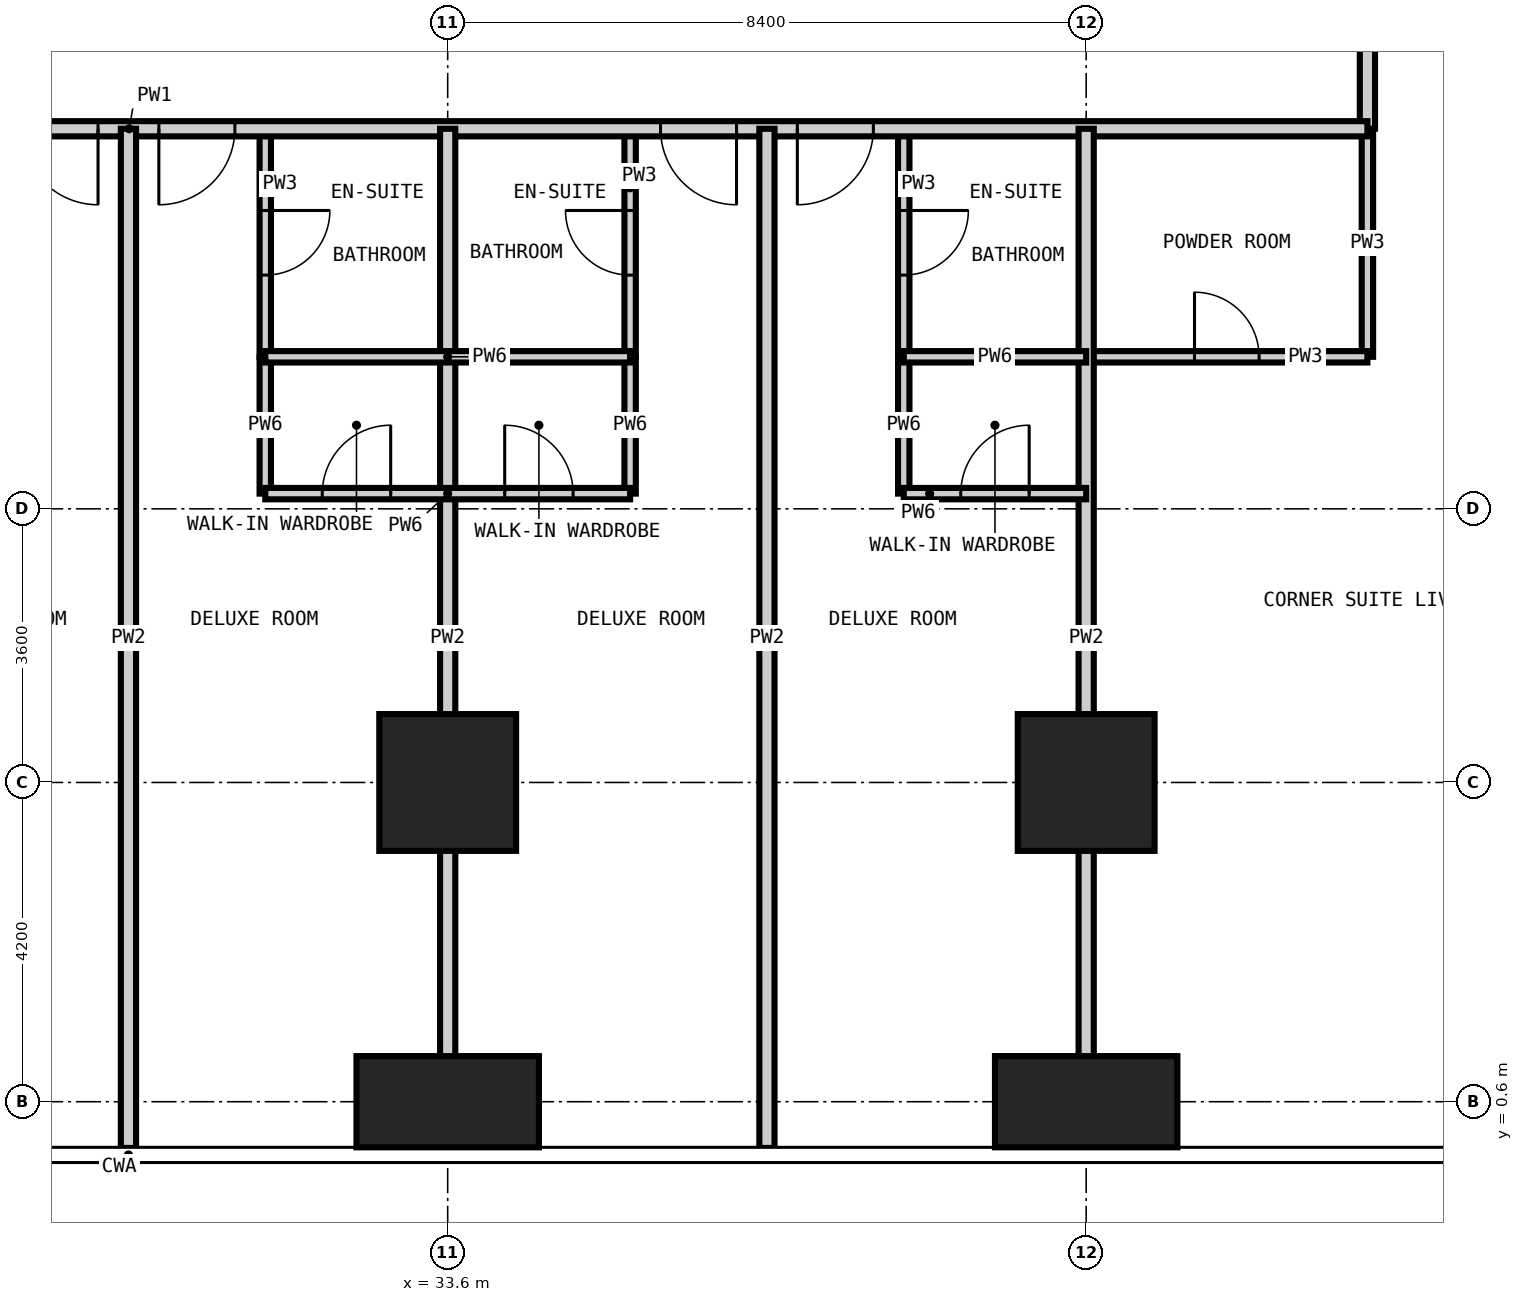
"""IFC4 building model, lengths in metres.
Left out: names, types, materials, properties, quantities, classifications, styles, units other than length and angle.
Written with IfcOpenShell. Run it as: python <this file> out.ifc"""

import sys

from ifc_helpers import new_model, si_unit, direction, frame, frame_2d, origin, origin_2d, place, context, subcontext, project, spatial, rectangle, extrude, element, fill, save


model = new_model("IFC4")
c1 = context("Model", 3, precision=1e-05, world=origin(), true_north=direction((0.0, 1.0)))
c2 = subcontext(c1, "Body", "Model", "MODEL_VIEW")
j1 = project(units=[si_unit("LENGTHUNIT", "METRE"), si_unit("PLANEANGLEUNIT", "RADIAN")], contexts=[c1])
p1 = place(None, origin())
s1 = spatial("IfcSite", under=j1, at=p1, CompositionType="ELEMENT")
p2 = place(p1, origin())
s2 = spatial("IfcBuilding", under=s1, at=p2, CompositionType="ELEMENT")
p3 = place(p2, frame((0.0, 0.0, 27.0)))
s3 = spatial("IfcBuildingStorey", under=s2, at=p3, CompositionType="ELEMENT", Elevation=27.0)
p4 = place(p3, frame((33.6, 0.6, -0.35), z_axis=(0.0, 0.0, 1.0), x_axis=(1.0, 0.0, 0.0)))
e1 = element("IfcColumn", 1, at=p4, inside=s3, PredefinedType="COLUMN", context=c2, shape_type="SweptSolid", body=[
    extrude(rectangle(XDim=2.4, YDim=1.2, at=origin_2d()), origin(), (0.0, 0.0, 1.0), 3.6),
])
p5 = place(p3, frame((33.6, 4.8, -0.35), z_axis=(0.0, 0.0, 1.0), x_axis=(1.0, 0.0, 0.0)))
e2 = element("IfcColumn", 2, at=p5, inside=s3, PredefinedType="COLUMN", context=c2, shape_type="SweptSolid", body=[
    extrude(rectangle(XDim=1.8, YDim=1.8, at=origin_2d()), origin(), (0.0, 0.0, 1.0), 3.6),
])
p6 = place(p3, frame((42.0, 0.6, -0.35), z_axis=(0.0, 0.0, 1.0), x_axis=(1.0, 0.0, 0.0)))
e3 = element("IfcColumn", 3, at=p6, inside=s3, PredefinedType="COLUMN", context=c2, shape_type="SweptSolid", body=[
    extrude(rectangle(XDim=2.4, YDim=1.2, at=origin_2d()), origin(), (0.0, 0.0, 1.0), 3.6),
])
p7 = place(p3, frame((42.0, 4.8, -0.35), z_axis=(0.0, 0.0, 1.0), x_axis=(1.0, 0.0, 0.0)))
e4 = element("IfcColumn", 4, at=p7, inside=s3, PredefinedType="COLUMN", context=c2, shape_type="SweptSolid", body=[
    extrude(rectangle(XDim=1.8, YDim=1.8, at=origin_2d()), origin(), (0.0, 0.0, 1.0), 3.6),
])
p8 = place(p3, frame((31.2, 10.4, 0.0), z_axis=(0.0, 0.0, 1.0), x_axis=(0.0, 1.0, 0.0)))
e5 = element("IfcWall", 5, at=p8, inside=s3, PredefinedType="PARTITIONING", context=c2, shape_type="SweptSolid", body=[
    extrude(rectangle(XDim=3.0, YDim=0.15, at=frame_2d((1.5, 0.0))), origin(), (0.0, 0.0, 1.0), 3.25),
])
p9 = place(p8, frame((1.075, 0.0, 0.0)))
e6 = element("IfcOpeningElement", 6, at=p9, cuts=e5, PredefinedType="OPENING", context=c2, shape_type="SweptSolid", body=[
    extrude(rectangle(XDim=0.85, YDim=2.1, at=frame_2d((0.425, 1.05))), frame((0.0, 0.085, 0.0), z_axis=(0.0, -1.0, 0.0), x_axis=(1.0, 0.0, 0.0)), (0.0, 0.0, 1.0), 0.17),
])
p10 = place(p3, frame((36.0, 10.4, 0.0), z_axis=(0.0, 0.0, 1.0), x_axis=(0.0, 1.0, 0.0)))
e7 = element("IfcWall", 7, at=p10, inside=s3, PredefinedType="PARTITIONING", context=c2, shape_type="SweptSolid", body=[
    extrude(rectangle(XDim=3.0, YDim=0.15, at=frame_2d((1.5, 0.0))), origin(), (0.0, 0.0, 1.0), 3.25),
])
p11 = place(p10, frame((1.075, 0.0, 0.0)))
e8 = element("IfcOpeningElement", 8, at=p11, cuts=e7, PredefinedType="OPENING", context=c2, shape_type="SweptSolid", body=[
    extrude(rectangle(XDim=0.85, YDim=2.1, at=frame_2d((0.425, 1.05))), frame((0.0, 0.085, 0.0), z_axis=(0.0, -1.0, 0.0), x_axis=(1.0, 0.0, 0.0)), (0.0, 0.0, 1.0), 0.17),
])
p12 = place(p3, frame((39.6, 10.4, 0.0), z_axis=(0.0, 0.0, 1.0), x_axis=(0.0, 1.0, 0.0)))
e9 = element("IfcWall", 9, at=p12, inside=s3, PredefinedType="PARTITIONING", context=c2, shape_type="SweptSolid", body=[
    extrude(rectangle(XDim=3.0, YDim=0.15, at=frame_2d((1.5, 0.0))), origin(), (0.0, 0.0, 1.0), 3.25),
])
p13 = place(p12, frame((1.075, 0.0, 0.0)))
e10 = element("IfcOpeningElement", 10, at=p13, cuts=e9, PredefinedType="OPENING", context=c2, shape_type="SweptSolid", body=[
    extrude(rectangle(XDim=0.85, YDim=2.1, at=frame_2d((0.425, 1.05))), frame((0.0, 0.085, 0.0), z_axis=(0.0, -1.0, 0.0), x_axis=(1.0, 0.0, 0.0)), (0.0, 0.0, 1.0), 0.17),
])
p14 = place(p3, frame((45.7, 10.4, 0.0), z_axis=(0.0, 0.0, 1.0), x_axis=(0.0, 1.0, 0.0)))
e11 = element("IfcWall", 11, at=p14, inside=s3, PredefinedType="PARTITIONING", context=c2, shape_type="SweptSolid", body=[
    extrude(rectangle(XDim=3.0, YDim=0.15, at=frame_2d((1.5, 0.0))), origin(), (0.0, 0.0, 1.0), 3.25),
])
p15 = place(p3, frame((42.0, 10.4, 0.0), z_axis=(0.0, 0.0, 1.0), x_axis=(1.0, 0.0, 0.0)))
e12 = element("IfcWall", 12, at=p15, inside=s3, PredefinedType="PARTITIONING", context=c2, shape_type="SweptSolid", body=[
    extrude(rectangle(XDim=3.7, YDim=0.15, at=frame_2d((1.85, 0.0))), origin(), (0.0, 0.0, 1.0), 3.25),
])
p16 = place(p15, frame((1.425, 0.0, 0.0)))
e13 = element("IfcOpeningElement", 13, at=p16, cuts=e12, PredefinedType="OPENING", context=c2, shape_type="SweptSolid", body=[
    extrude(rectangle(XDim=0.85, YDim=2.1, at=frame_2d((0.425, 1.05))), frame((0.0, 0.085, 0.0), z_axis=(0.0, -1.0, 0.0), x_axis=(1.0, 0.0, 0.0)), (0.0, 0.0, 1.0), 0.17),
])
p17 = place(p3, frame((45.7, 46.0, 0.0), z_axis=(0.0, 0.0, 1.0), x_axis=(0.0, -1.0, 0.0)))
e14 = element("IfcWall", 14, at=p17, inside=s3, PredefinedType="PARTITIONING", context=c2, shape_type="SweptSolid", body=[
    extrude(rectangle(XDim=32.6, YDim=0.2, at=frame_2d((16.3, 0.0))), origin(), (0.0, 0.0, 1.0), 3.25),
])
p18 = place(p17, frame((26.6, 0.0, 0.0)))
e15 = element("IfcOpeningElement", 15, at=p18, cuts=e14, PredefinedType="OPENING", context=c2, shape_type="SweptSolid", body=[
    extrude(rectangle(XDim=1.0, YDim=2.2, at=frame_2d((0.5, 1.1))), frame((0.0, 0.11, 0.0), z_axis=(0.0, -1.0, 0.0), x_axis=(1.0, 0.0, 0.0)), (0.0, 0.0, 1.0), 0.22),
])
p19 = place(p17, frame((22.4, 0.0, 0.0)))
e16 = element("IfcOpeningElement", 16, at=p19, cuts=e14, PredefinedType="OPENING", context=c2, shape_type="SweptSolid", body=[
    extrude(rectangle(XDim=1.0, YDim=2.2, at=frame_2d((0.5, 1.1))), frame((0.0, 0.11, 0.0), z_axis=(0.0, -1.0, 0.0), x_axis=(1.0, 0.0, 0.0)), (0.0, 0.0, 1.0), 0.22),
])
p20 = place(p17, frame((17.0, 0.0, 0.0)))
e17 = element("IfcOpeningElement", 17, at=p20, cuts=e14, PredefinedType="OPENING", context=c2, shape_type="SweptSolid", body=[
    extrude(rectangle(XDim=1.0, YDim=2.2, at=frame_2d((0.5, 1.1))), frame((0.0, 0.11, 0.0), z_axis=(0.0, -1.0, 0.0), x_axis=(1.0, 0.0, 0.0)), (0.0, 0.0, 1.0), 0.22),
])
p21 = place(p17, frame((15.2, 0.0, 0.0)))
e18 = element("IfcOpeningElement", 18, at=p21, cuts=e14, PredefinedType="OPENING", context=c2, shape_type="SweptSolid", body=[
    extrude(rectangle(XDim=1.0, YDim=2.2, at=frame_2d((0.5, 1.1))), frame((0.0, 0.11, 0.0), z_axis=(0.0, -1.0, 0.0), x_axis=(1.0, 0.0, 0.0)), (0.0, 0.0, 1.0), 0.22),
])
p22 = place(p17, frame((8.6, 0.0, 0.0)))
e19 = element("IfcOpeningElement", 19, at=p22, cuts=e14, PredefinedType="OPENING", context=c2, shape_type="SweptSolid", body=[
    extrude(rectangle(XDim=1.0, YDim=2.2, at=frame_2d((0.5, 1.1))), frame((0.0, 0.11, 0.0), z_axis=(0.0, -1.0, 0.0), x_axis=(1.0, 0.0, 0.0)), (0.0, 0.0, 1.0), 0.22),
])
p23 = place(p17, frame((6.8, 0.0, 0.0)))
e20 = element("IfcOpeningElement", 20, at=p23, cuts=e14, PredefinedType="OPENING", context=c2, shape_type="SweptSolid", body=[
    extrude(rectangle(XDim=1.0, YDim=2.2, at=frame_2d((0.5, 1.1))), frame((0.0, 0.11, 0.0), z_axis=(0.0, -1.0, 0.0), x_axis=(1.0, 0.0, 0.0)), (0.0, 0.0, 1.0), 0.22),
])
p24 = place(p17, frame((30.4, 0.0, 0.0)))
e21 = element("IfcOpeningElement", 21, at=p24, cuts=e14, PredefinedType="OPENING", context=c2, shape_type="SweptSolid", body=[
    extrude(rectangle(XDim=1.0, YDim=2.2, at=frame_2d((0.5, 1.1))), frame((0.0, 0.11, 0.0), z_axis=(0.0, -1.0, 0.0), x_axis=(1.0, 0.0, 0.0)), (0.0, 0.0, 1.0), 0.22),
])
p25 = place(p17, frame((1.5, 0.0, 0.0)))
e22 = element("IfcOpeningElement", 22, at=p25, cuts=e14, PredefinedType="OPENING", context=c2, shape_type="SweptSolid", body=[
    extrude(rectangle(XDim=1.0, YDim=2.2, at=frame_2d((0.5, 1.1))), frame((0.0, 0.11, 0.0), z_axis=(0.0, -1.0, 0.0), x_axis=(1.0, 0.0, 0.0)), (0.0, 0.0, 1.0), 0.22),
])
p26 = place(p3, frame((45.7, 13.4, 0.0), z_axis=(0.0, 0.0, 1.0), x_axis=(-1.0, 0.0, 0.0)))
e23 = element("IfcWall", 23, at=p26, inside=s3, PredefinedType="PARTITIONING", context=c2, shape_type="SweptSolid", body=[
    extrude(rectangle(XDim=32.3, YDim=0.2, at=frame_2d((16.15, 0.0))), origin(), (0.0, 0.0, 1.0), 3.25),
])
p27 = place(p26, frame((25.1, 0.0, 0.0)))
e24 = element("IfcOpeningElement", 24, at=p27, cuts=e23, PredefinedType="OPENING", context=c2, shape_type="SweptSolid", body=[
    extrude(rectangle(XDim=1.0, YDim=2.2, at=frame_2d((0.5, 1.1))), frame((0.0, 0.11, 0.0), z_axis=(0.0, -1.0, 0.0), x_axis=(1.0, 0.0, 0.0)), (0.0, 0.0, 1.0), 0.22),
])
p28 = place(p26, frame((23.3, 0.0, 0.0)))
e25 = element("IfcOpeningElement", 25, at=p28, cuts=e23, PredefinedType="OPENING", context=c2, shape_type="SweptSolid", body=[
    extrude(rectangle(XDim=1.0, YDim=2.2, at=frame_2d((0.5, 1.1))), frame((0.0, 0.11, 0.0), z_axis=(0.0, -1.0, 0.0), x_axis=(1.0, 0.0, 0.0)), (0.0, 0.0, 1.0), 0.22),
])
p29 = place(p26, frame((16.7, 0.0, 0.0)))
e26 = element("IfcOpeningElement", 26, at=p29, cuts=e23, PredefinedType="OPENING", context=c2, shape_type="SweptSolid", body=[
    extrude(rectangle(XDim=1.0, YDim=2.2, at=frame_2d((0.5, 1.1))), frame((0.0, 0.11, 0.0), z_axis=(0.0, -1.0, 0.0), x_axis=(1.0, 0.0, 0.0)), (0.0, 0.0, 1.0), 0.22),
])
p30 = place(p26, frame((14.9, 0.0, 0.0)))
e27 = element("IfcOpeningElement", 27, at=p30, cuts=e23, PredefinedType="OPENING", context=c2, shape_type="SweptSolid", body=[
    extrude(rectangle(XDim=1.0, YDim=2.2, at=frame_2d((0.5, 1.1))), frame((0.0, 0.11, 0.0), z_axis=(0.0, -1.0, 0.0), x_axis=(1.0, 0.0, 0.0)), (0.0, 0.0, 1.0), 0.22),
])
p31 = place(p26, frame((8.3, 0.0, 0.0)))
e28 = element("IfcOpeningElement", 28, at=p31, cuts=e23, PredefinedType="OPENING", context=c2, shape_type="SweptSolid", body=[
    extrude(rectangle(XDim=1.0, YDim=2.2, at=frame_2d((0.5, 1.1))), frame((0.0, 0.11, 0.0), z_axis=(0.0, -1.0, 0.0), x_axis=(1.0, 0.0, 0.0)), (0.0, 0.0, 1.0), 0.22),
])
p32 = place(p26, frame((6.5, 0.0, 0.0)))
e29 = element("IfcOpeningElement", 29, at=p32, cuts=e23, PredefinedType="OPENING", context=c2, shape_type="SweptSolid", body=[
    extrude(rectangle(XDim=1.0, YDim=2.2, at=frame_2d((0.5, 1.1))), frame((0.0, 0.11, 0.0), z_axis=(0.0, -1.0, 0.0), x_axis=(1.0, 0.0, 0.0)), (0.0, 0.0, 1.0), 0.22),
])
for number, where, z_axis, x_axis in (
    (30, (29.4, -0.008, 0.0), (0.0, 0.0, 1.0), (0.0, 1.0, 0.0)),
    (31, (33.6, -0.008, 0.0), (0.0, 0.0, 1.0), (0.0, 1.0, 0.0)),
    (32, (37.8, -0.008, 0.0), (0.0, 0.0, 1.0), (0.0, 1.0, 0.0)),
    (33, (42.0, -0.008, 0.0), (0.0, 0.0, 1.0), (0.0, 1.0, 0.0)),
):
    element("IfcWall", number, at=place(p3, frame(where, z_axis=z_axis, x_axis=x_axis)), inside=s3, PredefinedType="PARTITIONING", context=c2, shape_type="SweptSolid", body=[
        extrude(rectangle(XDim=13.408, YDim=0.2, at=frame_2d((6.704, 0.0))), origin(), (0.0, 0.0, 1.0), 3.25),
    ])
for number, where, z_axis, x_axis in (
    (34, (31.2, 8.6, 0.0), (0.0, 0.0, 1.0), (0.0, 1.0, 0.0)),
    (35, (36.0, 8.6, 0.0), (0.0, 0.0, 1.0), (0.0, 1.0, 0.0)),
    (36, (39.6, 8.6, 0.0), (0.0, 0.0, 1.0), (0.0, 1.0, 0.0)),
):
    element("IfcWall", number, at=place(p3, frame(where, z_axis=z_axis, x_axis=x_axis)), inside=s3, PredefinedType="PARTITIONING", context=c2, shape_type="SweptSolid", body=[
        extrude(rectangle(XDim=1.8, YDim=0.15, at=frame_2d((0.9, 0.0))), origin(), (0.0, 0.0, 1.0), 3.25),
    ])
p33 = place(p3, frame((31.2, 8.6, 0.0), z_axis=(0.0, 0.0, 1.0), x_axis=(1.0, 0.0, 0.0)))
e37 = element("IfcWall", 37, at=p33, inside=s3, PredefinedType="PARTITIONING", context=c2, shape_type="SweptSolid", body=[
    extrude(rectangle(XDim=4.8, YDim=0.15, at=frame_2d((2.4, 0.0))), origin(), (0.0, 0.0, 1.0), 3.25),
])
p34 = place(p33, frame((0.75, 0.0, 0.0)))
e38 = element("IfcOpeningElement", 38, at=p34, cuts=e37, PredefinedType="OPENING", context=c2, shape_type="SweptSolid", body=[
    extrude(rectangle(XDim=0.9, YDim=2.1, at=frame_2d((0.45, 1.05))), frame((0.0, 0.085, 0.0), z_axis=(0.0, -1.0, 0.0), x_axis=(1.0, 0.0, 0.0)), (0.0, 0.0, 1.0), 0.17),
])
p35 = place(p33, frame((3.15, 0.0, 0.0)))
e39 = element("IfcOpeningElement", 39, at=p35, cuts=e37, PredefinedType="OPENING", context=c2, shape_type="SweptSolid", body=[
    extrude(rectangle(XDim=0.9, YDim=2.1, at=frame_2d((0.45, 1.05))), frame((0.0, 0.085, 0.0), z_axis=(0.0, -1.0, 0.0), x_axis=(1.0, 0.0, 0.0)), (0.0, 0.0, 1.0), 0.17),
])
p36 = place(p3, frame((39.6, 8.6, 0.0), z_axis=(0.0, 0.0, 1.0), x_axis=(1.0, 0.0, 0.0)))
e40 = element("IfcWall", 40, at=p36, inside=s3, PredefinedType="PARTITIONING", context=c2, shape_type="SweptSolid", body=[
    extrude(rectangle(XDim=2.4, YDim=0.15, at=frame_2d((1.2, 0.0))), origin(), (0.0, 0.0, 1.0), 3.25),
])
p37 = place(p36, frame((0.75, 0.0, 0.0)))
e41 = element("IfcOpeningElement", 41, at=p37, cuts=e40, PredefinedType="OPENING", context=c2, shape_type="SweptSolid", body=[
    extrude(rectangle(XDim=0.9, YDim=2.1, at=frame_2d((0.45, 1.05))), frame((0.0, 0.085, 0.0), z_axis=(0.0, -1.0, 0.0), x_axis=(1.0, 0.0, 0.0)), (0.0, 0.0, 1.0), 0.17),
])
p38 = place(p3, frame((31.2, 10.4, 0.0), z_axis=(0.0, 0.0, 1.0), x_axis=(1.0, 0.0, 0.0)))
e42 = element("IfcWall", 42, at=p38, inside=s3, PredefinedType="PARTITIONING", context=c2, shape_type="SweptSolid", body=[
    extrude(rectangle(XDim=4.8, YDim=0.15, at=frame_2d((2.4, 0.0))), origin(), (0.0, 0.0, 1.0), 3.25),
])
p39 = place(p3, frame((39.6, 10.4, 0.0), z_axis=(0.0, 0.0, 1.0), x_axis=(1.0, 0.0, 0.0)))
e43 = element("IfcWall", 43, at=p39, inside=s3, PredefinedType="PARTITIONING", context=c2, shape_type="SweptSolid", body=[
    extrude(rectangle(XDim=2.4, YDim=0.15, at=frame_2d((1.2, 0.0))), origin(), (0.0, 0.0, 1.0), 3.25),
])
p40 = place(p29, origin())
e44 = element("IfcDoor", 44, at=p40, inside=s3, OperationType="SINGLE_SWING_LEFT", PredefinedType="DOOR", context=c2, shape_type="SweptSolid", body=[
    extrude(rectangle(XDim=1.0, YDim=2.2, at=frame_2d((0.5, 1.1))), frame((0.0, 0.025, 0.0), z_axis=(0.0, -1.0, 0.0), x_axis=(1.0, 0.0, 0.0)), (0.0, 0.0, 1.0), 0.05),
])
fill(e26, e44)
p41 = place(p30, origin())
e45 = element("IfcDoor", 45, at=p41, inside=s3, OperationType="SINGLE_SWING_RIGHT", PredefinedType="DOOR", context=c2, shape_type="SweptSolid", body=[
    extrude(rectangle(XDim=1.0, YDim=2.2, at=frame_2d((0.5, 1.1))), frame((0.0, 0.025, 0.0), z_axis=(0.0, -1.0, 0.0), x_axis=(1.0, 0.0, 0.0)), (0.0, 0.0, 1.0), 0.05),
])
fill(e27, e45)
p42 = place(p9, frame((0.85, 0.0, 0.0), z_axis=(0.0, 0.0, 1.0), x_axis=(-1.0, 0.0, 0.0)))
e46 = element("IfcDoor", 46, at=p42, inside=s3, OperationType="SINGLE_SWING_LEFT", PredefinedType="DOOR", context=c2, shape_type="SweptSolid", body=[
    extrude(rectangle(XDim=0.85, YDim=2.1, at=frame_2d((0.425, 1.05))), frame((0.0, 0.025, 0.0), z_axis=(0.0, -1.0, 0.0), x_axis=(1.0, 0.0, 0.0)), (0.0, 0.0, 1.0), 0.05),
])
fill(e6, e46)
p43 = place(p34, origin())
e47 = element("IfcDoor", 47, at=p43, inside=s3, OperationType="SINGLE_SWING_RIGHT", PredefinedType="DOOR", context=c2, shape_type="SweptSolid", body=[
    extrude(rectangle(XDim=0.9, YDim=2.1, at=frame_2d((0.45, 1.05))), frame((0.0, 0.025, 0.0), z_axis=(0.0, -1.0, 0.0), x_axis=(1.0, 0.0, 0.0)), (0.0, 0.0, 1.0), 0.05),
])
fill(e38, e47)
p44 = place(p31, origin())
e48 = element("IfcDoor", 48, at=p44, inside=s3, OperationType="SINGLE_SWING_LEFT", PredefinedType="DOOR", context=c2, shape_type="SweptSolid", body=[
    extrude(rectangle(XDim=1.0, YDim=2.2, at=frame_2d((0.5, 1.1))), frame((0.0, 0.025, 0.0), z_axis=(0.0, -1.0, 0.0), x_axis=(1.0, 0.0, 0.0)), (0.0, 0.0, 1.0), 0.05),
])
fill(e28, e48)
p45 = place(p11, origin())
e49 = element("IfcDoor", 49, at=p45, inside=s3, OperationType="SINGLE_SWING_RIGHT", PredefinedType="DOOR", context=c2, shape_type="SweptSolid", body=[
    extrude(rectangle(XDim=0.85, YDim=2.1, at=frame_2d((0.425, 1.05))), frame((0.0, 0.025, 0.0), z_axis=(0.0, -1.0, 0.0), x_axis=(1.0, 0.0, 0.0)), (0.0, 0.0, 1.0), 0.05),
])
fill(e8, e49)
p46 = place(p35, origin())
e50 = element("IfcDoor", 50, at=p46, inside=s3, OperationType="SINGLE_SWING_LEFT", PredefinedType="DOOR", context=c2, shape_type="SweptSolid", body=[
    extrude(rectangle(XDim=0.9, YDim=2.1, at=frame_2d((0.45, 1.05))), frame((0.0, 0.025, 0.0), z_axis=(0.0, -1.0, 0.0), x_axis=(1.0, 0.0, 0.0)), (0.0, 0.0, 1.0), 0.05),
])
fill(e39, e50)
p47 = place(p32, origin())
e51 = element("IfcDoor", 51, at=p47, inside=s3, OperationType="SINGLE_SWING_RIGHT", PredefinedType="DOOR", context=c2, shape_type="SweptSolid", body=[
    extrude(rectangle(XDim=1.0, YDim=2.2, at=frame_2d((0.5, 1.1))), frame((0.0, 0.025, 0.0), z_axis=(0.0, -1.0, 0.0), x_axis=(1.0, 0.0, 0.0)), (0.0, 0.0, 1.0), 0.05),
])
fill(e29, e51)
p48 = place(p13, frame((0.85, 0.0, 0.0), z_axis=(0.0, 0.0, 1.0), x_axis=(-1.0, 0.0, 0.0)))
e52 = element("IfcDoor", 52, at=p48, inside=s3, OperationType="SINGLE_SWING_LEFT", PredefinedType="DOOR", context=c2, shape_type="SweptSolid", body=[
    extrude(rectangle(XDim=0.85, YDim=2.1, at=frame_2d((0.425, 1.05))), frame((0.0, 0.025, 0.0), z_axis=(0.0, -1.0, 0.0), x_axis=(1.0, 0.0, 0.0)), (0.0, 0.0, 1.0), 0.05),
])
fill(e10, e52)
p49 = place(p37, origin())
e53 = element("IfcDoor", 53, at=p49, inside=s3, OperationType="SINGLE_SWING_RIGHT", PredefinedType="DOOR", context=c2, shape_type="SweptSolid", body=[
    extrude(rectangle(XDim=0.9, YDim=2.1, at=frame_2d((0.45, 1.05))), frame((0.0, 0.025, 0.0), z_axis=(0.0, -1.0, 0.0), x_axis=(1.0, 0.0, 0.0)), (0.0, 0.0, 1.0), 0.05),
])
fill(e41, e53)
p50 = place(p16, origin())
e54 = element("IfcDoor", 54, at=p50, inside=s3, OperationType="SINGLE_SWING_LEFT", PredefinedType="DOOR", context=c2, shape_type="SweptSolid", body=[
    extrude(rectangle(XDim=0.85, YDim=2.1, at=frame_2d((0.425, 1.05))), frame((0.0, 0.025, 0.0), z_axis=(0.0, -1.0, 0.0), x_axis=(1.0, 0.0, 0.0)), (0.0, 0.0, 1.0), 0.05),
])
fill(e13, e54)
save(model, sys.argv[1])
